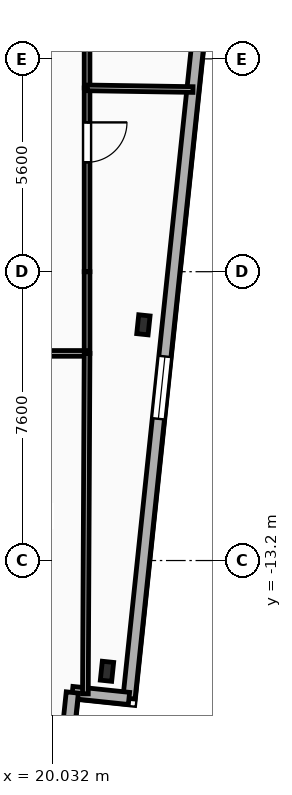
"""IFC4 building model, lengths in metres.
Left out: names, types, materials, properties, quantities, classifications, styles, units other than length and angle.
Written with IfcOpenShell. Run it as: python <this file> out.ifc"""

import sys

from ifc_helpers import new_model, si_unit, direction, frame, frame_2d, origin, origin_2d, place, context, subcontext, project, spatial, rectangle, i_section, extrude, element, fill, save


model = new_model("IFC4")
c1 = context("Model", 3, precision=1e-05, world=origin(), true_north=direction((0.0, 1.0)))
c2 = subcontext(c1, "Body", "Model", "MODEL_VIEW")
j1 = project(units=[si_unit("LENGTHUNIT", "METRE"), si_unit("PLANEANGLEUNIT", "RADIAN")], contexts=[c1])
p1 = place(None, origin())
s1 = spatial("IfcSite", under=j1, at=p1, CompositionType="ELEMENT")
p2 = place(p1, origin())
s2 = spatial("IfcBuilding", under=s1, at=p2, CompositionType="ELEMENT")
p3 = place(p2, frame((0.0, 0.0, 199.75)))
s3 = spatial("IfcBuildingStorey", under=s2, at=p3, CompositionType="ELEMENT", Elevation=199.75)
for number, where, z_axis, x_axis in (
    (1, (21.474, -16.114, 0.0), (0.0, 0.0, 1.0), (0.995, -0.105, 0.0)),
    (2, (22.433, -6.998, 0.0), (0.0, 0.0, 1.0), (0.995, -0.105, 0.0)),
):
    element("IfcColumn", number, at=place(p3, frame(where, z_axis=z_axis, x_axis=x_axis)), inside=s3, PredefinedType="COLUMN", context=c2, shape_type="SweptSolid", body=[
        extrude(i_section(OverallWidth=0.3, OverallDepth=0.5, WebThickness=0.014, FlangeThickness=0.028, FilletRadius=0.027, at=origin_2d()), origin(), (0.0, 0.0, 1.0), 3.35),
    ])
p4 = place(p3, frame((25.063, 11.814, 0.0), z_axis=(0.0, 0.0, 1.0), x_axis=(-0.104523275986, -0.99452244056, 0.0)))
e3 = element("IfcWall", 3, at=p4, inside=s3, PredefinedType="SOLIDWALL", context=c2, shape_type="SweptSolid", body=[
    extrude(rectangle(XDim=28.8, YDim=0.32, at=frame_2d((14.4, 0.0))), origin(), (0.0, 0.0, 1.0), 3.04),
])
p5 = place(p4, frame((5.793, 0.0, 0.85)))
e4 = element("IfcOpeningElement", 4, at=p5, cuts=e3, PredefinedType="OPENING", context=c2, shape_type="SweptSolid", body=[
    extrude(rectangle(XDim=1.65, YDim=1.85, at=frame_2d((0.825, 0.925))), frame((0.0, 0.17, 0.0), z_axis=(0.0, -1.0, 0.0), x_axis=(1.0, 0.0, 0.0)), (0.0, 0.0, 1.0), 0.34),
])
p6 = place(p4, frame((19.752, 0.0, 0.85)))
e5 = element("IfcOpeningElement", 5, at=p6, cuts=e3, PredefinedType="OPENING", context=c2, shape_type="SweptSolid", body=[
    extrude(rectangle(XDim=1.65, YDim=1.85, at=frame_2d((0.825, 0.925))), frame((0.0, 0.17, 0.0), z_axis=(0.0, -1.0, 0.0), x_axis=(1.0, 0.0, 0.0)), (0.0, 0.0, 1.0), 0.34),
])
p7 = place(p3, frame((22.053, -16.828, 0.0), z_axis=(0.0, 0.0, 1.0), x_axis=(-0.994526834051, 0.104481464157, 0.0)))
e6 = element("IfcWall", 6, at=p7, inside=s3, PredefinedType="SOLIDWALL", context=c2, shape_type="SweptSolid", body=[
    extrude(rectangle(XDim=1.5, YDim=0.32, at=frame_2d((0.75, 0.0))), origin(), (0.0, 0.0, 1.0), 3.04),
])
p8 = place(p3, frame((20.561, -16.672, 0.0), z_axis=(0.0, 0.0, 1.0), x_axis=(-0.104498377516, -0.994525057048, 0.0)))
e7 = element("IfcWall", 7, at=p8, inside=s3, PredefinedType="SOLIDWALL", context=c2, shape_type="SweptSolid", body=[
    extrude(rectangle(XDim=1.5, YDim=0.32, at=frame_2d((0.75, 0.0))), origin(), (0.0, 0.0, 1.0), 3.04),
])
p9 = place(p3, frame((20.95, -5.6, 0.0), z_axis=(0.0, 0.0, 1.0), x_axis=(0.0, -1.0, 0.0)))
e8 = element("IfcWall", 8, at=p9, inside=s3, PredefinedType="PARTITIONING", context=c2, shape_type="SweptSolid", body=[
    extrude(rectangle(XDim=2.15, YDim=0.15, at=frame_2d((1.075, 0.0))), origin(), (0.0, 0.0, 1.0), 3.04),
])
p10 = place(p3, frame((20.95, -7.75, 0.0), z_axis=(0.0, 0.0, 1.0), x_axis=(-1.0, 0.0, 0.0)))
e9 = element("IfcWall", 9, at=p10, inside=s3, PredefinedType="PARTITIONING", context=c2, shape_type="SweptSolid", body=[
    extrude(rectangle(XDim=6.983, YDim=0.15, at=frame_2d((3.492, 0.0))), origin(), (0.0, 0.0, 1.0), 3.04),
])
p11 = place(p10, frame((4.757, 0.0, 0.0)))
e10 = element("IfcOpeningElement", 10, at=p11, cuts=e9, PredefinedType="OPENING", context=c2, shape_type="SweptSolid", body=[
    extrude(rectangle(XDim=1.05, YDim=2.15, at=frame_2d((0.525, 1.075))), frame((0.0, 0.085, 0.0), z_axis=(0.0, -1.0, 0.0), x_axis=(1.0, 0.0, 0.0)), (0.0, 0.0, 1.0), 0.17),
])
p12 = place(p3, frame((20.95, -0.763, 0.0), z_axis=(0.0, 0.0, 1.0), x_axis=(0.0, -1.0, 0.0)))
e11 = element("IfcWall", 11, at=p12, inside=s3, PredefinedType="PARTITIONING", context=c2, shape_type="SweptSolid", body=[
    extrude(rectangle(XDim=4.837, YDim=0.15, at=frame_2d((2.418, 0.0))), origin(), (0.0, 0.0, 1.0), 2.695),
])
p13 = place(p12, frame((0.908, 0.0, 0.0)))
e12 = element("IfcOpeningElement", 12, at=p13, cuts=e11, PredefinedType="OPENING", context=c2, shape_type="SweptSolid", body=[
    extrude(rectangle(XDim=1.05, YDim=2.15, at=frame_2d((0.525, 1.075))), frame((0.0, 0.085, 0.0), z_axis=(0.0, -1.0, 0.0), x_axis=(1.0, 0.0, 0.0)), (0.0, 0.0, 1.0), 0.17),
])
p14 = place(p3, frame((20.95, 8.5, 0.0), z_axis=(0.0, 0.0, 1.0), x_axis=(0.0, -1.0, 0.0)))
e13 = element("IfcWall", 13, at=p14, inside=s3, PredefinedType="PARTITIONING", context=c2, shape_type="SweptSolid", body=[
    extrude(rectangle(XDim=9.263, YDim=0.15, at=frame_2d((4.632, 0.0))), origin(), (0.0, 0.0, 1.0), 2.695),
])
p15 = place(p14, frame((6.751, 0.0, 0.0)))
e14 = element("IfcOpeningElement", 14, at=p15, cuts=e13, PredefinedType="OPENING", context=c2, shape_type="SweptSolid", body=[
    extrude(rectangle(XDim=1.05, YDim=2.15, at=frame_2d((0.525, 1.075))), frame((0.0, 0.085, 0.0), z_axis=(0.0, -1.0, 0.0), x_axis=(1.0, 0.0, 0.0)), (0.0, 0.0, 1.0), 0.17),
])
p16 = place(p3, frame((20.95, -0.763, 0.0), z_axis=(0.0, 0.0, 1.0), x_axis=(0.999875696831, -0.015766765259, 0.0)))
e15 = element("IfcWall", 15, at=p16, inside=s3, PredefinedType="PARTITIONING", context=c2, shape_type="SweptSolid", body=[
    extrude(rectangle(XDim=2.787, YDim=0.15, at=frame_2d((1.394, 0.0))), origin(), (0.0, 0.0, 1.0), 3.04),
])
p17 = place(p3, frame((20.906, -16.708, 0.0), z_axis=(0.0, 0.0, 1.0), x_axis=(0.004905642486, 0.999987967264, 0.0)))
e16 = element("IfcWall", 16, at=p17, inside=s3, PredefinedType="PARTITIONING", context=c2, shape_type="SweptSolid", body=[
    extrude(rectangle(XDim=8.958, YDim=0.15, at=frame_2d((4.479, 0.0))), origin(), (0.0, 0.0, 1.0), 2.665),
])
p18 = place(p6, origin())
e17 = element("IfcWindow", 17, at=p18, inside=s3, PartitioningType="SINGLE_PANEL", PredefinedType="WINDOW", context=c2, shape_type="SweptSolid", body=[
    extrude(rectangle(XDim=1.65, YDim=1.85, at=frame_2d((0.825, 0.925))), frame((0.0, 0.03, 0.0), z_axis=(0.0, -1.0, 0.0), x_axis=(1.0, 0.0, 0.0)), (0.0, 0.0, 1.0), 0.06),
])
fill(e5, e17)
p19 = place(p13, origin())
e18 = element("IfcDoor", 18, at=p19, inside=s3, OperationType="SINGLE_SWING_LEFT", PredefinedType="DOOR", context=c2, shape_type="SweptSolid", body=[
    extrude(rectangle(XDim=1.05, YDim=2.15, at=frame_2d((0.525, 1.075))), frame((0.0, 0.025, 0.0), z_axis=(0.0, -1.0, 0.0), x_axis=(1.0, 0.0, 0.0)), (0.0, 0.0, 1.0), 0.05),
])
fill(e12, e18)
save(model, sys.argv[1])
